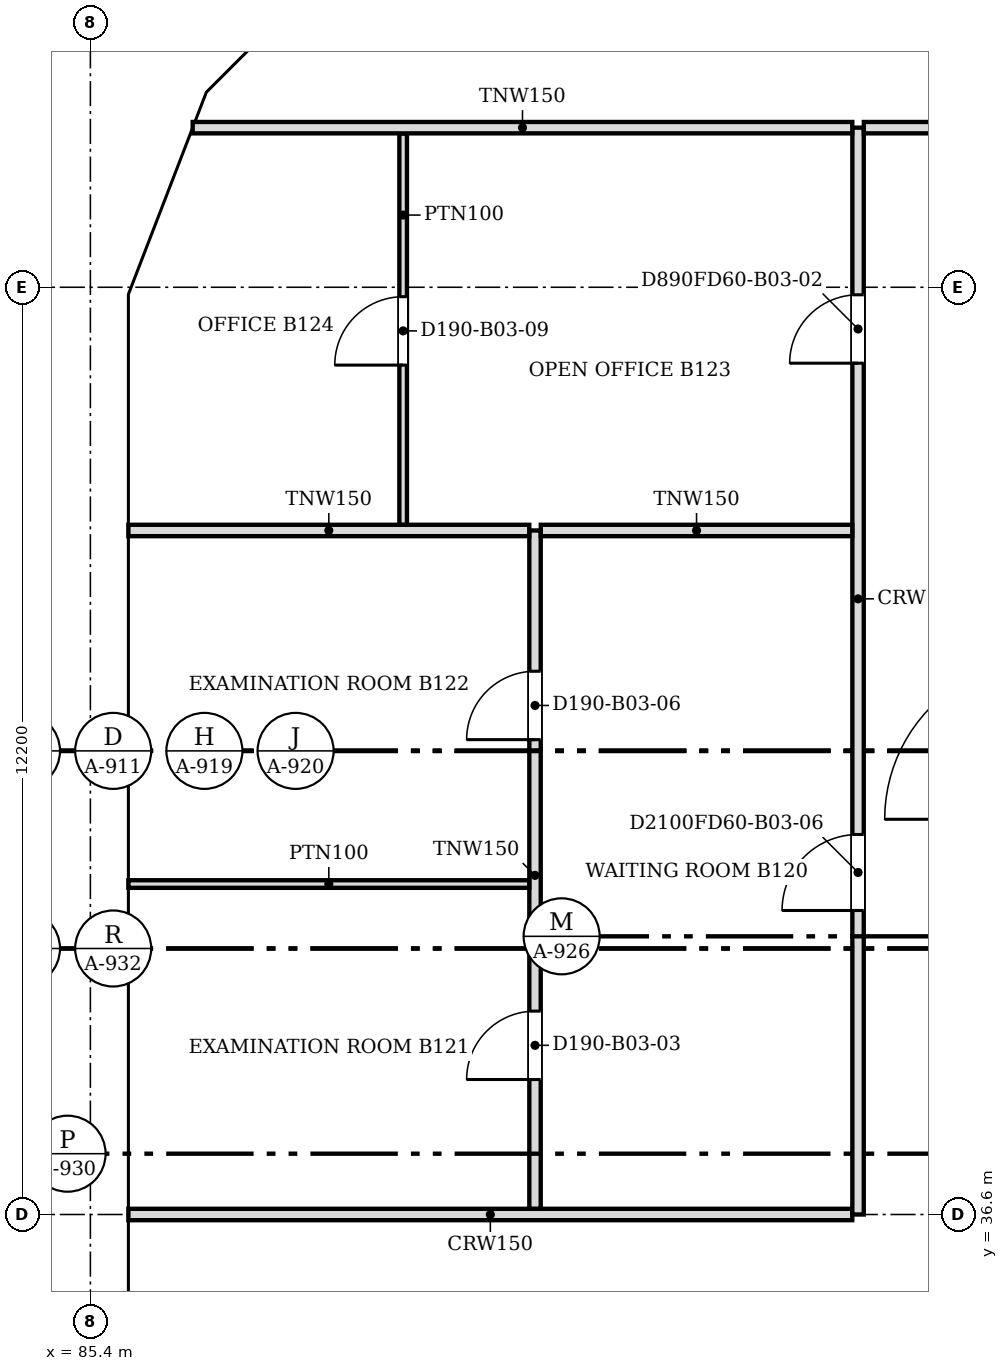
"""IFC4 building model, lengths in metres.
Left out: names, types, materials, properties, quantities, classifications, styles, units other than length and angle.
Written with IfcOpenShell. Run it as: python <this file> out.ifc"""

import sys

from ifc_helpers import new_model, si_unit, direction, frame, frame_2d, origin, place, context, subcontext, project, spatial, polyline, rectangle, outline, extrude, faceted_brep, source, transform, mapped, element, fill, save


model = new_model("IFC4")
c1 = context("Model", 3, precision=1e-05, world=origin(), true_north=direction((0.0, 1.0)))
c2 = subcontext(c1, "Body", "Model", "MODEL_VIEW")
j1 = project(units=[si_unit("LENGTHUNIT", "METRE"), si_unit("PLANEANGLEUNIT", "RADIAN")], contexts=[c1])
p1 = place(None, origin())
s1 = spatial("IfcSite", under=j1, at=p1, CompositionType="ELEMENT")
p2 = place(p1, origin())
s2 = spatial("IfcBuilding", under=s1, at=p2, CompositionType="ELEMENT")
p3 = place(p2, frame((0.0, 0.0, 33.4)))
s3 = spatial("IfcBuildingStorey", under=s2, at=p3, CompositionType="ELEMENT", Elevation=33.4)
m1 = source(origin(), c2, "Body", "Brep", [
    faceted_brep([(2.944, -0.25, 0.0), (2.997, -0.25, 0.068), (2.997, -0.25, 7.532), (2.944, -0.25, 7.6), (0.0, -0.25, 3.8), (0.053, 0.25, 3.868), (2.891, 0.25, 7.532), (2.891, 0.25, 0.068), (0.053, 0.25, 3.731), (2.944, 0.0, 0.0), (2.944, 0.0, 7.6), (0.0, 0.0, 3.8)], [[[0, 1, 2, 3, 4]], [[5, 6, 7, 8]], [[1, 0, 9]], [[10, 3, 2]], [[6, 5, 11, 4, 3, 10]], [[8, 7, 9, 0, 4, 11]], [[8, 11, 5]], [[1, 9, 7, 6, 10, 2]]]),
])
p4 = place(p3, frame((88.794, 53.588, -3.8), z_axis=(0.0, 0.0, 1.0), x_axis=(-0.707066050402, -0.707147509625, 0.0)))
e1 = element("IfcWall", 1, at=p4, inside=s3, PredefinedType="SOLIDWALL", context=c2, shape_type="MappedRepresentation", body=[
    mapped(m1, transform((0.0, 0.0, 0.0), scale=1.0)),
])
m2 = source(origin(), c2, "Body", "SweptSolid", [
    extrude(outline(polyline([(2.744, 6.934), (0.316, 3.8), (2.744, 0.666), (2.744, 6.934)])), frame((0.0, 0.26, 0.0), z_axis=(0.0, -1.0, 0.0), x_axis=(1.0, 0.0, 0.0)), (0.0, 0.0, 1.0), 0.52),
])
p5 = place(p4, origin())
e2 = element("IfcOpeningElement", 2, at=p5, cuts=e1, PredefinedType="OPENING", context=c2, shape_type="MappedRepresentation", body=[
    mapped(m2, transform((0.0, 0.0, 0.0), scale=1.0)),
])
m3 = source(origin(), c2, "Body", "Brep", [
    faceted_brep([(0.053, -0.25, 0.0), (3.003, -0.25, 3.8), (0.053, -0.25, 7.6), (0.0, -0.25, 7.531), (0.0, -0.25, 0.068), (0.106, 0.25, 7.532), (2.957, 0.25, 3.86), (2.957, 0.25, 3.74), (0.106, 0.25, 0.068), (3.003, 0.0, 3.8), (0.053, 0.0, 0.0), (0.053, 0.0, 7.6)], [[[0, 1, 2, 3, 4]], [[5, 6, 7, 8]], [[8, 7, 9, 1, 0, 10]], [[6, 5, 11, 2, 1, 9]], [[3, 2, 11]], [[10, 0, 4]], [[8, 10, 4, 3, 11, 5]], [[9, 7, 6]]]),
])
p6 = place(p3, frame((86.731, 51.556, -3.8), z_axis=(0.0, 0.0, 1.0), x_axis=(-0.359855894603, -0.933007896601, 0.0)))
e3 = element("IfcWall", 3, at=p6, inside=s3, PredefinedType="SOLIDWALL", context=c2, shape_type="MappedRepresentation", body=[
    mapped(m3, transform((0.0, 0.0, 0.0), scale=1.0)),
])
m4 = source(origin(), c2, "Body", "SweptSolid", [
    extrude(outline(polyline([(0.253, 0.665), (2.687, 3.8), (0.253, 6.935), (0.253, 0.665)])), frame((0.0, 0.26, 0.0), z_axis=(0.0, -1.0, 0.0), x_axis=(1.0, 0.0, 0.0)), (0.0, 0.0, 1.0), 0.52),
])
p7 = place(p6, origin())
e4 = element("IfcOpeningElement", 4, at=p7, cuts=e3, PredefinedType="OPENING", context=c2, shape_type="MappedRepresentation", body=[
    mapped(m4, transform((0.0, 0.0, 0.0), scale=1.0)),
])
m5 = source(origin(), c2, "Body", "Brep", [
    faceted_brep([(3.003, -0.25, 0.0), (6.053, -0.25, 3.8), (3.003, -0.25, 7.6), (0.0, -0.25, 3.8), (0.047, 0.25, 3.859), (3.003, 0.25, 7.6), (6.053, 0.25, 3.8), (3.003, 0.25, 0.0), (0.047, 0.25, 3.741), (0.0, 0.0, 3.8)], [[[0, 1, 2, 3]], [[4, 5, 6, 7, 8]], [[7, 6, 1, 0]], [[6, 5, 2, 1]], [[5, 4, 9, 3, 2]], [[8, 7, 0, 3, 9]], [[8, 9, 4]]]),
])
p8 = place(p3, frame((85.65, 48.753, -3.8), z_axis=(0.0, 0.0, 1.0), x_axis=(0.0, -1.0, 0.0)))
e5 = element("IfcWall", 5, at=p8, inside=s3, PredefinedType="SOLIDWALL", context=c2, shape_type="MappedRepresentation", body=[
    mapped(m5, transform((0.0, 0.0, 0.0), scale=1.0)),
])
m6 = source(origin(), c2, "Body", "SweptSolid", [
    extrude(outline(polyline([(3.005, 0.401), (5.733, 3.8), (3.005, 7.199), (0.319, 3.8), (3.005, 0.401)])), frame((0.0, 0.26, 0.0), z_axis=(0.0, -1.0, 0.0), x_axis=(1.0, 0.0, 0.0)), (0.0, 0.0, 1.0), 0.52),
])
p9 = place(p8, origin())
e6 = element("IfcOpeningElement", 6, at=p9, cuts=e5, PredefinedType="OPENING", context=c2, shape_type="MappedRepresentation", body=[
    mapped(m6, transform((0.0, 0.0, 0.0), scale=1.0)),
])
m7 = source(origin(), c2, "Body", "Brep", [
    faceted_brep([(3.05, -0.25, 0.0), (6.1, -0.25, 3.8), (6.1, -0.25, 3.8), (3.05, -0.25, 7.6), (0.0, -0.25, 3.8), (0.0, 0.25, 3.8), (3.05, 0.25, 7.6), (6.1, 0.25, 3.8), (6.1, 0.25, 3.8), (3.05, 0.25, 0.0)], [[[0, 1, 2, 3, 4]], [[5, 6, 7, 8, 9]], [[9, 8, 1, 0]], [[7, 6, 3, 2]], [[6, 5, 4, 3]], [[5, 9, 0, 4]], [[1, 8, 7, 2]]]),
])
p10 = place(p3, frame((85.65, 42.7, -3.8), z_axis=(0.0, 0.0, 1.0), x_axis=(0.0, -1.0, 0.0)))
e7 = element("IfcWall", 7, at=p10, inside=s3, PredefinedType="SOLIDWALL", context=c2, shape_type="MappedRepresentation", body=[
    mapped(m7, transform((0.0, 0.0, 0.0), scale=1.0)),
])
m8 = source(origin(), c2, "Body", "SweptSolid", [
    extrude(outline(polyline([(3.05, 0.399), (5.78, 3.8), (3.05, 7.2), (0.321, 3.8), (3.05, 0.399)])), frame((0.0, 0.26, 0.0), z_axis=(0.0, -1.0, 0.0), x_axis=(1.0, 0.0, 0.0)), (0.0, 0.0, 1.0), 0.52),
])
p11 = place(p10, origin())
e8 = element("IfcOpeningElement", 8, at=p11, cuts=e7, PredefinedType="OPENING", context=c2, shape_type="MappedRepresentation", body=[
    mapped(m8, transform((0.0, 0.0, 0.0), scale=1.0)),
])
m9 = source(origin(), c2, "Body", "SweptSolid", [
    extrude(outline(polyline([(3.05, 0.0), (6.1, 3.8), (3.05, 7.6), (0.0, 3.8), (3.05, 0.0)])), frame((0.0, 0.25, 0.0), z_axis=(0.0, -1.0, 0.0), x_axis=(1.0, 0.0, 0.0)), (0.0, 0.0, 1.0), 0.5),
])
p12 = place(p3, frame((85.65, 36.6, -3.8), z_axis=(0.0, 0.0, 1.0), x_axis=(0.0, -1.0, 0.0)))
e9 = element("IfcWall", 9, at=p12, inside=s3, PredefinedType="SOLIDWALL", context=c2, shape_type="MappedRepresentation", body=[
    mapped(m9, transform((0.0, 0.0, 0.0), scale=1.0)),
])
p13 = place(p12, origin())
e10 = element("IfcOpeningElement", 10, at=p13, cuts=e9, PredefinedType="OPENING", context=c2, shape_type="MappedRepresentation", body=[
    mapped(m8, transform((0.0, 0.0, 0.0), scale=1.0)),
])
p14 = place(p2, frame((0.0, 0.0, 37.2)))
s4 = spatial("IfcBuildingStorey", under=s2, at=p14, CompositionType="ELEMENT", Elevation=37.2)
m10 = source(origin(), c2, "Body", "Brep", [
    faceted_brep([(0.053, -0.25, 0.0), (2.997, -0.25, 3.8), (0.053, -0.25, 7.6), (0.0, -0.25, 7.532), (0.0, -0.25, 0.068), (0.106, 0.25, 7.532), (2.944, 0.25, 3.868), (2.944, 0.25, 3.732), (0.106, 0.25, 0.068), (2.997, 0.0, 3.8), (0.053, 0.0, 0.0), (0.053, 0.0, 7.6)], [[[0, 1, 2, 3, 4]], [[5, 6, 7, 8]], [[8, 7, 9, 1, 0, 10]], [[6, 5, 11, 2, 1, 9]], [[3, 2, 11]], [[10, 0, 4]], [[8, 10, 4, 3, 11, 5]], [[9, 7, 6]]]),
])
p15 = place(p14, frame((88.831, 53.625, -3.8), z_axis=(0.0, 0.0, 1.0), x_axis=(-0.707147509625, -0.707066050402, 0.0)))
e11 = element("IfcWall", 11, at=p15, inside=s4, PredefinedType="SOLIDWALL", context=c2, shape_type="MappedRepresentation", body=[
    mapped(m10, transform((0.0, 0.0, 0.0), scale=1.0)),
])
m11 = source(origin(), c2, "Body", "SweptSolid", [
    extrude(outline(polyline([(0.253, 0.667), (2.681, 3.8), (0.253, 6.934), (0.253, 0.667)])), frame((0.0, 0.26, 0.0), z_axis=(0.0, -1.0, 0.0), x_axis=(1.0, 0.0, 0.0)), (0.0, 0.0, 1.0), 0.52),
])
p16 = place(p15, origin())
e12 = element("IfcOpeningElement", 12, at=p16, cuts=e11, PredefinedType="OPENING", context=c2, shape_type="MappedRepresentation", body=[
    mapped(m11, transform((0.0, 0.0, 0.0), scale=1.0)),
])
m12 = source(origin(), c2, "Body", "Brep", [
    faceted_brep([(2.95, -0.25, 0.0), (2.997, -0.25, 0.059), (2.997, -0.25, 7.541), (2.95, -0.25, 7.6), (0.0, -0.25, 3.8), (0.053, 0.25, 3.868), (2.904, 0.25, 7.54), (2.904, 0.25, 0.06), (0.053, 0.25, 3.732), (2.95, 0.0, 0.0), (2.95, 0.0, 7.6), (0.0, 0.0, 3.8)], [[[0, 1, 2, 3, 4]], [[5, 6, 7, 8]], [[1, 0, 9]], [[10, 3, 2]], [[6, 5, 11, 4, 3, 10]], [[8, 7, 9, 0, 4, 11]], [[8, 11, 5]], [[1, 9, 7, 6, 10, 2]]]),
])
p17 = place(p14, frame((86.712, 51.506, -3.8), z_axis=(0.0, 0.0, 1.0), x_axis=(-0.359874094142, -0.933000876937, 0.0)))
e13 = element("IfcWall", 13, at=p17, inside=s4, PredefinedType="SOLIDWALL", context=c2, shape_type="MappedRepresentation", body=[
    mapped(m12, transform((0.0, 0.0, 0.0), scale=1.0)),
])
m13 = source(origin(), c2, "Body", "SweptSolid", [
    extrude(outline(polyline([(2.75, 6.935), (0.316, 3.8), (2.75, 0.665), (2.75, 6.935)])), frame((0.0, 0.26, 0.0), z_axis=(0.0, -1.0, 0.0), x_axis=(1.0, 0.0, 0.0)), (0.0, 0.0, 1.0), 0.52),
])
p18 = place(p17, origin())
e14 = element("IfcOpeningElement", 14, at=p18, cuts=e13, PredefinedType="OPENING", context=c2, shape_type="MappedRepresentation", body=[
    mapped(m13, transform((0.0, 0.0, 0.0), scale=1.0)),
])
m14 = source(origin(), c2, "Body", "Brep", [
    faceted_brep([(0.047, -0.25, 0.0), (3.05, -0.25, 3.8), (0.047, -0.25, 7.6), (0.0, -0.25, 7.54), (0.0, -0.25, 0.06), (0.093, 0.25, 7.541), (3.05, 0.25, 3.8), (0.093, 0.25, 0.059), (0.047, 0.0, 0.0), (0.047, 0.0, 7.6)], [[[0, 1, 2, 3, 4]], [[5, 6, 7]], [[7, 6, 1, 0, 8]], [[6, 5, 9, 2, 1]], [[3, 2, 9]], [[8, 0, 4]], [[7, 8, 4, 3, 9, 5]]]),
])
p19 = place(p14, frame((85.65, 48.8, -3.8), z_axis=(0.0, 0.0, 1.0), x_axis=(0.0, -1.0, 0.0)))
e15 = element("IfcWall", 15, at=p19, inside=s4, PredefinedType="SOLIDWALL", context=c2, shape_type="MappedRepresentation", body=[
    mapped(m14, transform((0.0, 0.0, 0.0), scale=1.0)),
])
m15 = source(origin(), c2, "Body", "SweptSolid", [
    extrude(outline(polyline([(0.247, 0.656), (2.731, 3.8), (0.247, 6.944), (0.247, 0.656)])), frame((0.0, 0.26, 0.0), z_axis=(0.0, -1.0, 0.0), x_axis=(1.0, 0.0, 0.0)), (0.0, 0.0, 1.0), 0.52),
])
p20 = place(p19, origin())
e16 = element("IfcOpeningElement", 16, at=p20, cuts=e15, PredefinedType="OPENING", context=c2, shape_type="MappedRepresentation", body=[
    mapped(m15, transform((0.0, 0.0, 0.0), scale=1.0)),
])
m16 = source(origin(), c2, "Body", "SweptSolid", [
    extrude(outline(polyline([(3.05, 0.0), (6.1, 3.8), (3.05, 7.6), (0.0, 3.8), (3.05, 0.0)])), frame((0.0, 0.25, 0.0), z_axis=(0.0, -1.0, 0.0), x_axis=(1.0, 0.0, 0.0)), (0.0, 0.0, 1.0), 0.5),
])
p21 = place(p14, frame((85.65, 45.75, -3.8), z_axis=(0.0, 0.0, 1.0), x_axis=(0.0, -1.0, 0.0)))
e17 = element("IfcWall", 17, at=p21, inside=s4, PredefinedType="SOLIDWALL", context=c2, shape_type="MappedRepresentation", body=[
    mapped(m16, transform((0.0, 0.0, 0.0), scale=1.0)),
])
m17 = source(origin(), c2, "Body", "SweptSolid", [
    extrude(outline(polyline([(3.05, 0.399), (5.78, 3.8), (3.05, 7.201), (0.321, 3.8), (3.05, 0.399)])), frame((0.0, 0.26, 0.0), z_axis=(0.0, -1.0, 0.0), x_axis=(1.0, 0.0, 0.0)), (0.0, 0.0, 1.0), 0.52),
])
p22 = place(p21, origin())
e18 = element("IfcOpeningElement", 18, at=p22, cuts=e17, PredefinedType="OPENING", context=c2, shape_type="MappedRepresentation", body=[
    mapped(m17, transform((0.0, 0.0, 0.0), scale=1.0)),
])
m18 = source(origin(), c2, "Body", "Brep", [
    faceted_brep([(3.05, -0.25, 0.0), (6.1, -0.25, 3.8), (6.1, -0.25, 3.8), (3.05, -0.25, 7.6), (0.0, -0.25, 3.8), (0.0, 0.25, 3.8), (3.05, 0.25, 7.6), (6.1, 0.25, 3.8), (6.1, 0.25, 3.8), (3.05, 0.25, 0.0)], [[[0, 1, 2, 3, 4]], [[5, 6, 7, 8, 9]], [[9, 8, 1, 0]], [[7, 6, 3, 2]], [[6, 5, 4, 3]], [[5, 9, 0, 4]], [[1, 8, 7, 2]]]),
])
p23 = place(p14, frame((85.65, 39.65, -3.8), z_axis=(0.0, 0.0, 1.0), x_axis=(0.0, -1.0, 0.0)))
e19 = element("IfcWall", 19, at=p23, inside=s4, PredefinedType="SOLIDWALL", context=c2, shape_type="MappedRepresentation", body=[
    mapped(m18, transform((0.0, 0.0, 0.0), scale=1.0)),
])
p24 = place(p23, origin())
e20 = element("IfcOpeningElement", 20, at=p24, cuts=e19, PredefinedType="OPENING", context=c2, shape_type="MappedRepresentation", body=[
    mapped(m17, transform((0.0, 0.0, 0.0), scale=1.0)),
])
p25 = place(p3, frame((85.9, 36.6, 0.0), z_axis=(0.0, 0.0, 1.0), x_axis=(1.0, 0.0, 0.0)))
e21 = element("IfcWall", 21, at=p25, inside=s3, PredefinedType="PARTITIONING", context=c2, shape_type="SweptSolid", body=[
    extrude(rectangle(XDim=9.524, YDim=0.15, at=frame_2d((4.762, 0.0))), origin(), (0.0, 0.0, 1.0), 3.067),
])
p26 = place(p3, frame((95.5, 36.6, 0.0), z_axis=(0.0, 0.0, 1.0), x_axis=(0.0, 1.0, 0.0)))
e22 = element("IfcWall", 22, at=p26, inside=s3, PredefinedType="PARTITIONING", context=c2, shape_type="SweptSolid", body=[
    extrude(rectangle(XDim=14.3, YDim=0.15, at=frame_2d((7.15, 0.0))), origin(), (0.0, 0.0, 1.0), 3.067),
])
m19 = source(origin(), c2, "Body", "SweptSolid", [
    extrude(rectangle(XDim=0.9, YDim=2.1, at=frame_2d((0.45, 1.05))), frame((0.0, 0.085, 0.0), z_axis=(0.0, -1.0, 0.0), x_axis=(1.0, 0.0, 0.0)), (0.0, 0.0, 1.0), 0.17),
])
p27 = place(p26, frame((11.201, 0.0, 0.0)))
e23 = element("IfcOpeningElement", 23, at=p27, cuts=e22, PredefinedType="OPENING", context=c2, shape_type="MappedRepresentation", body=[
    mapped(m19, transform((0.0, 0.0, 0.0), scale=1.0)),
])
m20 = source(origin(), c2, "Body", "SweptSolid", [
    extrude(rectangle(XDim=1.0, YDim=2.1, at=frame_2d((0.5, 1.05))), frame((0.0, 0.085, 0.0), z_axis=(0.0, -1.0, 0.0), x_axis=(1.0, 0.0, 0.0)), (0.0, 0.0, 1.0), 0.17),
])
p28 = place(p26, frame((4.0, 0.0, 0.0)))
e24 = element("IfcOpeningElement", 24, at=p28, cuts=e22, PredefinedType="OPENING", context=c2, shape_type="MappedRepresentation", body=[
    mapped(m20, transform((0.0, 0.0, 0.0), scale=1.0)),
])
p29 = place(p3, frame((91.25, 36.676, 0.0), z_axis=(0.0, 0.0, 1.0), x_axis=(0.0, 1.0, 0.0)))
e25 = element("IfcWall", 25, at=p29, inside=s3, PredefinedType="PARTITIONING", context=c2, shape_type="SweptSolid", body=[
    extrude(rectangle(XDim=8.924, YDim=0.15, at=frame_2d((4.462, 0.0))), origin(), (0.0, 0.0, 1.0), 3.067),
])
p30 = place(p29, frame((1.7, 0.0, 0.0)))
e26 = element("IfcOpeningElement", 26, at=p30, cuts=e25, PredefinedType="OPENING", context=c2, shape_type="MappedRepresentation", body=[
    mapped(m19, transform((0.0, 0.0, 0.0), scale=1.0)),
])
p31 = place(p29, frame((6.172, 0.0, 0.0)))
e27 = element("IfcOpeningElement", 27, at=p31, cuts=e25, PredefinedType="OPENING", context=c2, shape_type="MappedRepresentation", body=[
    mapped(m19, transform((0.0, 0.0, 0.0), scale=1.0)),
])
p32 = place(p3, frame((85.9, 40.948, 0.0), z_axis=(0.0, 0.0, 1.0), x_axis=(1.0, 0.0, 0.0)))
e28 = element("IfcWall", 28, at=p32, inside=s3, PredefinedType="PARTITIONING", context=c2, shape_type="SweptSolid", body=[
    extrude(rectangle(XDim=5.274, YDim=0.1, at=frame_2d((2.637, 0.0))), origin(), (0.0, 0.0, 1.0), 3.067),
])
p33 = place(p3, frame((85.9, 45.6, 0.0), z_axis=(0.0, 0.0, 1.0), x_axis=(1.0, 0.0, 0.0)))
e29 = element("IfcWall", 29, at=p33, inside=s3, PredefinedType="PARTITIONING", context=c2, shape_type="SweptSolid", body=[
    extrude(rectangle(XDim=5.274, YDim=0.15, at=frame_2d((2.637, 0.0))), origin(), (0.0, 0.0, 1.0), 3.067),
])
p34 = place(p3, frame((91.326, 45.6, 0.0), z_axis=(0.0, 0.0, 1.0), x_axis=(1.0, 0.0, 0.0)))
e30 = element("IfcWall", 30, at=p34, inside=s3, PredefinedType="PARTITIONING", context=c2, shape_type="SweptSolid", body=[
    extrude(rectangle(XDim=4.098, YDim=0.15, at=frame_2d((2.049, 0.0))), origin(), (0.0, 0.0, 1.0), 3.067),
])
p35 = place(p3, frame((89.515, 45.676, 0.0), z_axis=(0.0, 0.0, 1.0), x_axis=(0.0, 1.0, 0.0)))
e31 = element("IfcWall", 31, at=p35, inside=s3, PredefinedType="PARTITIONING", context=c2, shape_type="SweptSolid", body=[
    extrude(rectangle(XDim=5.148, YDim=0.1, at=frame_2d((2.574, 0.0))), origin(), (0.0, 0.0, 1.0), 3.067),
])
m21 = source(origin(), c2, "Body", "SweptSolid", [
    extrude(rectangle(XDim=0.9, YDim=2.1, at=frame_2d((0.45, 1.05))), frame((0.0, 0.06, 0.0), z_axis=(0.0, -1.0, 0.0), x_axis=(1.0, 0.0, 0.0)), (0.0, 0.0, 1.0), 0.12),
])
p36 = place(p35, frame((2.1, 0.0, 0.0)))
e32 = element("IfcOpeningElement", 32, at=p36, cuts=e31, PredefinedType="OPENING", context=c2, shape_type="MappedRepresentation", body=[
    mapped(m21, transform((0.0, 0.0, 0.0), scale=1.0)),
])
p37 = place(p3, frame((86.746, 50.9, 0.0), z_axis=(0.0, 0.0, 1.0), x_axis=(1.0, 0.0, 0.0)))
e33 = element("IfcWall", 33, at=p37, inside=s3, PredefinedType="PARTITIONING", context=c2, shape_type="SweptSolid", body=[
    extrude(rectangle(XDim=8.678, YDim=0.15, at=frame_2d((4.339, 0.0))), origin(), (0.0, 0.0, 1.0), 3.067),
])
p38 = place(p3, frame((95.576, 50.9, 0.0), z_axis=(0.0, 0.0, 1.0), x_axis=(1.0, 0.0, 0.0)))
e34 = element("IfcWall", 34, at=p38, inside=s3, PredefinedType="PARTITIONING", context=c2, shape_type="SweptSolid", body=[
    extrude(rectangle(XDim=4.424, YDim=0.15, at=frame_2d((2.212, 0.0))), origin(), (0.0, 0.0, 1.0), 3.067),
])
m22 = source(origin(), c2, "Body", "SweptSolid", [
    extrude(rectangle(XDim=0.9, YDim=2.1, at=frame_2d((0.45, 1.05))), frame((0.0, 0.025, 0.0), z_axis=(0.0, -1.0, 0.0), x_axis=(1.0, 0.0, 0.0)), (0.0, 0.0, 1.0), 0.05),
])
p39 = place(p30, origin())
e35 = element("IfcDoor", 35, at=p39, inside=s3, OperationType="SINGLE_SWING_LEFT", PredefinedType="DOOR", context=c2, shape_type="MappedRepresentation", body=[
    mapped(m22, transform((0.0, 0.0, 0.0), scale=1.0)),
])
fill(e26, e35)
p40 = place(p31, origin())
e36 = element("IfcDoor", 36, at=p40, inside=s3, OperationType="SINGLE_SWING_LEFT", PredefinedType="DOOR", context=c2, shape_type="MappedRepresentation", body=[
    mapped(m22, transform((0.0, 0.0, 0.0), scale=1.0)),
])
fill(e27, e36)
p41 = place(p36, origin())
e37 = element("IfcDoor", 37, at=p41, inside=s3, OperationType="SINGLE_SWING_LEFT", PredefinedType="DOOR", context=c2, shape_type="MappedRepresentation", body=[
    mapped(m22, transform((0.0, 0.0, 0.0), scale=1.0)),
])
fill(e32, e37)
p42 = place(p27, origin())
e38 = element("IfcDoor", 38, at=p42, inside=s3, OperationType="SINGLE_SWING_LEFT", PredefinedType="DOOR", context=c2, shape_type="MappedRepresentation", body=[
    mapped(m22, transform((0.0, 0.0, 0.0), scale=1.0)),
])
fill(e23, e38)
m23 = source(origin(), c2, "Body", "SweptSolid", [
    extrude(rectangle(XDim=1.0, YDim=2.1, at=frame_2d((0.5, 1.05))), frame((0.0, 0.025, 0.0), z_axis=(0.0, -1.0, 0.0), x_axis=(1.0, 0.0, 0.0)), (0.0, 0.0, 1.0), 0.05),
])
p43 = place(p28, origin())
e39 = element("IfcDoor", 39, at=p43, inside=s3, OperationType="SINGLE_SWING_LEFT", PredefinedType="DOOR", context=c2, shape_type="MappedRepresentation", body=[
    mapped(m23, transform((0.0, 0.0, 0.0), scale=1.0)),
])
fill(e24, e39)
save(model, sys.argv[1])
